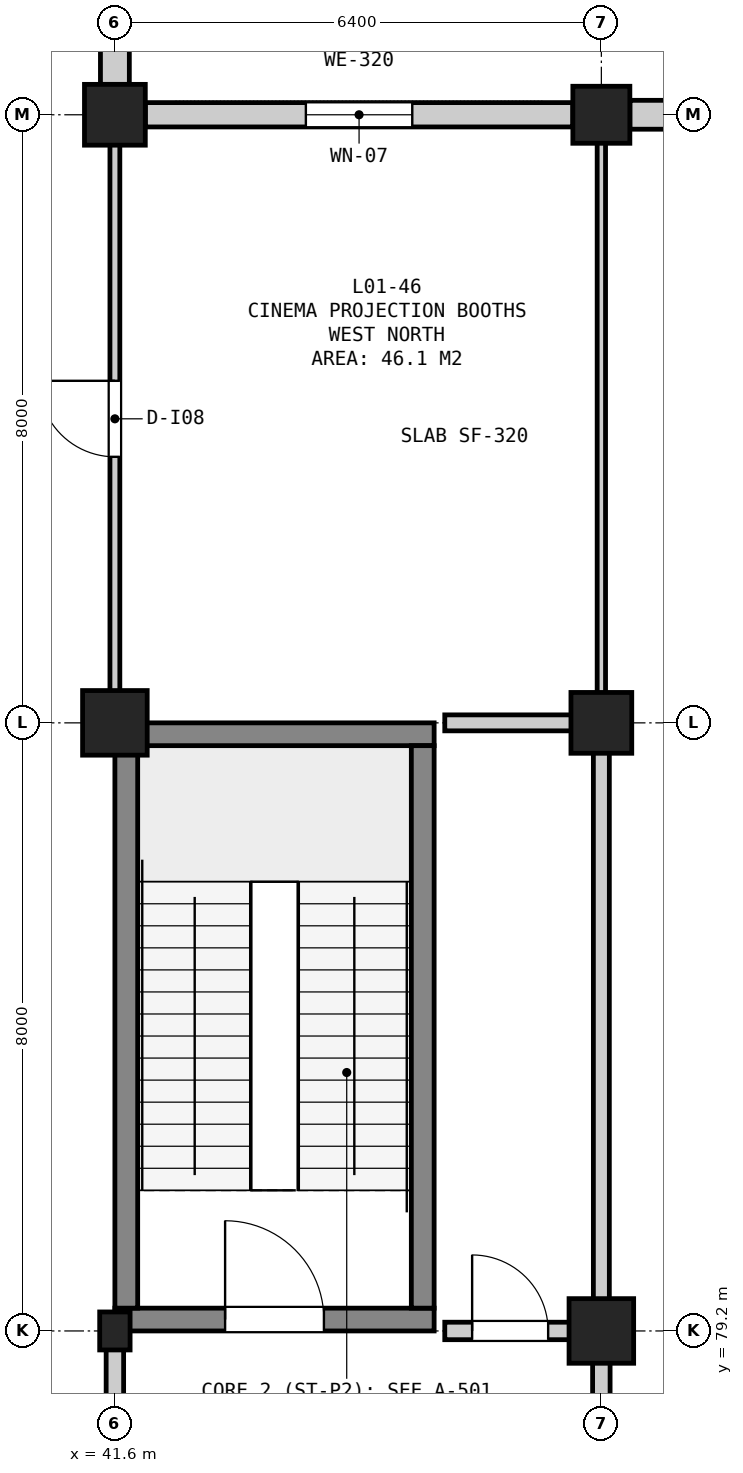
"""IFC4 building model, lengths in metres.
Left out: names, types, materials, properties, quantities, classifications, styles, units other than length and angle.
Written with IfcOpenShell. Run it as: python <this file> out.ifc"""

import sys

from ifc_helpers import new_model, si_unit, direction, frame, frame_2d, origin, origin_2d, place, context, subcontext, project, spatial, rectangle, extrude, element, fill, save


model = new_model("IFC4")
c1 = context("Model", 3, precision=1e-05, world=origin(), true_north=direction((0.0, 1.0)))
c2 = subcontext(c1, "Body", "Model", "MODEL_VIEW")
j1 = project(units=[si_unit("LENGTHUNIT", "METRE"), si_unit("PLANEANGLEUNIT", "RADIAN")], contexts=[c1])
p1 = place(None, origin())
s1 = spatial("IfcSite", under=j1, at=p1, CompositionType="ELEMENT")
p2 = place(p1, origin())
s2 = spatial("IfcBuilding", under=s1, at=p2, CompositionType="ELEMENT")
p3 = place(p2, frame((0.0, 0.0, 5.4)))
s3 = spatial("IfcBuildingStorey", under=s2, at=p3, CompositionType="ELEMENT", Elevation=5.4)
p4 = place(p3, frame((41.6, 79.2, 0.0), z_axis=(0.0, 0.0, 1.0), x_axis=(1.0, 0.0, 0.0)))
e1 = element("IfcColumn", 1, at=p4, inside=s3, PredefinedType="COLUMN", context=c2, shape_type="SweptSolid", body=[
    extrude(rectangle(XDim=0.4, YDim=0.5, at=origin_2d()), origin(), (0.0, 0.0, 1.0), 5.4),
])
p5 = place(p3, frame((41.6, 87.2, 0.0), z_axis=(0.0, 0.0, 1.0), x_axis=(1.0, 0.0, 0.0)))
e2 = element("IfcColumn", 2, at=p5, inside=s3, PredefinedType="COLUMN", context=c2, shape_type="SweptSolid", body=[
    extrude(rectangle(XDim=0.85, YDim=0.85, at=origin_2d()), origin(), (0.0, 0.0, 1.0), 5.4),
])
p6 = place(p3, frame((41.6, 95.2, 0.0), z_axis=(0.0, 0.0, 1.0), x_axis=(1.0, 0.0, 0.0)))
e3 = element("IfcColumn", 3, at=p6, inside=s3, PredefinedType="COLUMN", context=c2, shape_type="SweptSolid", body=[
    extrude(rectangle(XDim=0.8, YDim=0.8, at=origin_2d()), origin(), (0.0, 0.0, 1.0), 5.4),
])
p7 = place(p3, frame((48.0, 79.2, 0.0), z_axis=(0.0, 0.0, 1.0), x_axis=(1.0, 0.0, 0.0)))
e4 = element("IfcColumn", 4, at=p7, inside=s3, PredefinedType="COLUMN", context=c2, shape_type="SweptSolid", body=[
    extrude(rectangle(XDim=0.85, YDim=0.85, at=origin_2d()), origin(), (0.0, 0.0, 1.0), 5.4),
])
p8 = place(p3, frame((48.0, 87.2, 0.0), z_axis=(0.0, 0.0, 1.0), x_axis=(1.0, 0.0, 0.0)))
e5 = element("IfcColumn", 5, at=p8, inside=s3, PredefinedType="COLUMN", context=c2, shape_type="SweptSolid", body=[
    extrude(rectangle(XDim=0.8, YDim=0.8, at=origin_2d()), origin(), (0.0, 0.0, 1.0), 5.4),
])
p9 = place(p3, frame((48.0, 95.2, 0.0), z_axis=(0.0, 0.0, 1.0), x_axis=(1.0, 0.0, 0.0)))
e6 = element("IfcColumn", 6, at=p9, inside=s3, PredefinedType="COLUMN", context=c2, shape_type="SweptSolid", body=[
    extrude(rectangle(XDim=0.75, YDim=0.75, at=origin_2d()), origin(), (0.0, 0.0, 1.0), 5.4),
])
p10 = place(p3, frame((54.075, 95.2, 0.0), z_axis=(0.0, 0.0, 1.0), x_axis=(-1.0, 0.0, 0.0)))
e7 = element("IfcWall", 7, at=p10, inside=s3, PredefinedType="SOLIDWALL", context=c2, shape_type="SweptSolid", body=[
    extrude(rectangle(XDim=5.7, YDim=0.38, at=frame_2d((2.85, 0.0))), origin(), (0.0, 0.0, 1.0), 4.44),
])
p11 = place(p10, frame((2.1, 0.0, 0.9)))
e8 = element("IfcOpeningElement", 8, at=p11, cuts=e7, PredefinedType="OPENING", context=c2, shape_type="SweptSolid", body=[
    extrude(rectangle(XDim=1.5, YDim=1.85, at=frame_2d((0.75, 0.925))), frame((0.0, 0.202, 0.0), z_axis=(0.0, -1.0, 0.0), x_axis=(1.0, 0.0, 0.0)), (0.0, 0.0, 1.0), 0.404),
])
p12 = place(p3, frame((47.625, 95.2, 0.0), z_axis=(0.0, 0.0, 1.0), x_axis=(-1.0, 0.0, 0.0)))
e9 = element("IfcWall", 9, at=p12, inside=s3, PredefinedType="SOLIDWALL", context=c2, shape_type="SweptSolid", body=[
    extrude(rectangle(XDim=5.625, YDim=0.32, at=frame_2d((2.812, 0.0))), origin(), (0.0, 0.0, 1.0), 4.44),
])
p13 = place(p12, frame((2.113, 0.0, 0.9)))
e10 = element("IfcOpeningElement", 10, at=p13, cuts=e9, PredefinedType="OPENING", context=c2, shape_type="SweptSolid", body=[
    extrude(rectangle(XDim=1.4, YDim=1.8, at=frame_2d((0.7, 0.9))), frame((0.0, 0.172, 0.0), z_axis=(0.0, -1.0, 0.0), x_axis=(1.0, 0.0, 0.0)), (0.0, 0.0, 1.0), 0.344),
])
p14 = place(p3, frame((41.6, 95.6, 0.0), z_axis=(0.0, 0.0, 1.0), x_axis=(0.0, 1.0, 0.0)))
e11 = element("IfcWall", 11, at=p14, inside=s3, PredefinedType="SOLIDWALL", context=c2, shape_type="SweptSolid", body=[
    extrude(rectangle(XDim=12.875, YDim=0.38, at=frame_2d((6.438, 0.0))), origin(), (0.0, 0.0, 1.0), 3.975),
])
p15 = place(p14, frame((5.762, 0.0, 0.9)))
e12 = element("IfcOpeningElement", 12, at=p15, cuts=e11, PredefinedType="OPENING", context=c2, shape_type="SweptSolid", body=[
    extrude(rectangle(XDim=1.35, YDim=1.75, at=frame_2d((0.675, 0.875))), frame((0.0, 0.202, 0.0), z_axis=(0.0, -1.0, 0.0), x_axis=(1.0, 0.0, 0.0)), (0.0, 0.0, 1.0), 0.404),
])
p16 = place(p3, frame((41.6, 79.35, 0.0), z_axis=(0.0, 0.0, 1.0), x_axis=(1.0, 0.0, 0.0)))
e13 = element("IfcWall", 13, at=p16, inside=s3, PredefinedType="SHEAR", context=c2, shape_type="SweptSolid", body=[
    extrude(rectangle(XDim=4.2, YDim=0.3, at=frame_2d((2.1, 0.0))), origin(), (0.0, 0.0, 1.0), 5.1),
])
p17 = place(p16, frame((1.45, 0.0, 0.0)))
e14 = element("IfcOpeningElement", 14, at=p17, cuts=e13, PredefinedType="OPENING", context=c2, shape_type="SweptSolid", body=[
    extrude(rectangle(XDim=1.3, YDim=2.18, at=frame_2d((0.65, 1.09))), frame((0.0, 0.162, 0.0), z_axis=(0.0, -1.0, 0.0), x_axis=(1.0, 0.0, 0.0)), (0.0, 0.0, 1.0), 0.324),
])
p18 = place(p3, frame((41.6, 87.05, 0.0), z_axis=(0.0, 0.0, 1.0), x_axis=(1.0, 0.0, 0.0)))
e15 = element("IfcWall", 15, at=p18, inside=s3, PredefinedType="SHEAR", context=c2, shape_type="SweptSolid", body=[
    extrude(rectangle(XDim=4.2, YDim=0.3, at=frame_2d((2.1, 0.0))), origin(), (0.0, 0.0, 1.0), 5.1),
])
for number, where, z_axis, x_axis in (
    (16, (41.75, 79.5, 0.0), (0.0, 0.0, 1.0), (0.0, 1.0, 0.0)),
    (17, (45.65, 79.5, 0.0), (0.0, 0.0, 1.0), (0.0, 1.0, 0.0)),
):
    element("IfcWall", number, at=place(p3, frame(where, z_axis=z_axis, x_axis=x_axis)), inside=s3, PredefinedType="SHEAR", context=c2, shape_type="SweptSolid", body=[
        extrude(rectangle(XDim=7.4, YDim=0.3, at=frame_2d((3.7, 0.0))), origin(), (0.0, 0.0, 1.0), 5.1),
    ])
p19 = place(p3, frame((45.94, 79.2, 0.0), z_axis=(0.0, 0.0, 1.0), x_axis=(1.0, 0.0, 0.0)))
e18 = element("IfcWall", 18, at=p19, inside=s3, PredefinedType="SOLIDWALL", context=c2, shape_type="SweptSolid", body=[
    extrude(rectangle(XDim=1.92, YDim=0.23, at=frame_2d((0.96, 0.0))), origin(), (0.0, 0.0, 1.0), 4.435),
])
p20 = place(p19, frame((0.36, 0.0, 0.0)))
e19 = element("IfcOpeningElement", 19, at=p20, cuts=e18, PredefinedType="OPENING", context=c2, shape_type="SweptSolid", body=[
    extrude(rectangle(XDim=1.0, YDim=2.15, at=frame_2d((0.5, 1.075))), frame((0.0, 0.127, 0.0), z_axis=(0.0, -1.0, 0.0), x_axis=(1.0, 0.0, 0.0)), (0.0, 0.0, 1.0), 0.254),
])
for number, where, z_axis, x_axis in (
    (20, (41.6, 75.54, 0.0), (0.0, 0.0, 1.0), (0.0, 1.0, 0.0)),
    (21, (48.0, 75.54, 0.0), (0.0, 0.0, 1.0), (0.0, 1.0, 0.0)),
):
    element("IfcWall", number, at=place(p3, frame(where, z_axis=z_axis, x_axis=x_axis)), inside=s3, PredefinedType="SOLIDWALL", context=c2, shape_type="SweptSolid", body=[
        extrude(rectangle(XDim=3.52, YDim=0.23, at=frame_2d((1.76, 0.0))), origin(), (0.0, 0.0, 1.0), 4.435),
    ])
p21 = place(p3, frame((45.94, 87.2, 0.0), z_axis=(0.0, 0.0, 1.0), x_axis=(1.0, 0.0, 0.0)))
e22 = element("IfcWall", 22, at=p21, inside=s3, PredefinedType="SOLIDWALL", context=c2, shape_type="SweptSolid", body=[
    extrude(rectangle(XDim=1.92, YDim=0.21, at=frame_2d((0.96, 0.0))), origin(), (0.0, 0.0, 1.0), 4.585),
])
p22 = place(p3, frame((48.0, 79.34, 0.0), z_axis=(0.0, 0.0, 1.0), x_axis=(0.0, 1.0, 0.0)))
e23 = element("IfcWall", 23, at=p22, inside=s3, PredefinedType="SOLIDWALL", context=c2, shape_type="SweptSolid", body=[
    extrude(rectangle(XDim=7.72, YDim=0.21, at=frame_2d((3.86, 0.0))), origin(), (0.0, 0.0, 1.0), 4.535),
])
p23 = place(p3, frame((41.6, 87.34, 0.0), z_axis=(0.0, 0.0, 1.0), x_axis=(0.0, 1.0, 0.0)))
e24 = element("IfcWall", 24, at=p23, inside=s3, PredefinedType="PARTITIONING", context=c2, shape_type="SweptSolid", body=[
    extrude(rectangle(XDim=7.755, YDim=0.13, at=frame_2d((3.877, 0.0))), origin(), (0.0, 0.0, 1.0), 4.585),
])
p24 = place(p23, frame((3.36, 0.0, 0.0)))
e25 = element("IfcOpeningElement", 25, at=p24, cuts=e24, PredefinedType="OPENING", context=c2, shape_type="SweptSolid", body=[
    extrude(rectangle(XDim=1.0, YDim=2.15, at=frame_2d((0.5, 1.075))), frame((0.0, 0.077, 0.0), z_axis=(0.0, -1.0, 0.0), x_axis=(1.0, 0.0, 0.0)), (0.0, 0.0, 1.0), 0.154),
])
p25 = place(p3, frame((48.0, 87.34, 0.0), z_axis=(0.0, 0.0, 1.0), x_axis=(0.0, 1.0, 0.0)))
e26 = element("IfcWall", 26, at=p25, inside=s3, PredefinedType="PARTITIONING", context=c2, shape_type="SweptSolid", body=[
    extrude(rectangle(XDim=7.755, YDim=0.11, at=frame_2d((3.877, 0.0))), origin(), (0.0, 0.0, 1.0), 4.585),
])
p26 = place(p13, origin())
e27 = element("IfcWindow", 27, at=p26, inside=s3, PartitioningType="SINGLE_PANEL", PredefinedType="WINDOW", context=c2, shape_type="SweptSolid", body=[
    extrude(rectangle(XDim=1.4, YDim=1.8, at=frame_2d((0.7, 0.9))), frame((0.0, 0.03, 0.0), z_axis=(0.0, -1.0, 0.0), x_axis=(1.0, 0.0, 0.0)), (0.0, 0.0, 1.0), 0.06),
])
fill(e10, e27)
p27 = place(p17, origin())
e28 = element("IfcDoor", 28, at=p27, inside=s3, OperationType="SINGLE_SWING_LEFT", PredefinedType="DOOR", context=c2, shape_type="SweptSolid", body=[
    extrude(rectangle(XDim=1.3, YDim=2.18, at=frame_2d((0.65, 1.09))), frame((0.0, 0.025, 0.0), z_axis=(0.0, -1.0, 0.0), x_axis=(1.0, 0.0, 0.0)), (0.0, 0.0, 1.0), 0.05),
])
fill(e14, e28)
p28 = place(p20, origin())
e29 = element("IfcDoor", 29, at=p28, inside=s3, OperationType="SINGLE_SWING_LEFT", PredefinedType="DOOR", context=c2, shape_type="SweptSolid", body=[
    extrude(rectangle(XDim=1.0, YDim=2.15, at=frame_2d((0.5, 1.075))), frame((0.0, 0.025, 0.0), z_axis=(0.0, -1.0, 0.0), x_axis=(1.0, 0.0, 0.0)), (0.0, 0.0, 1.0), 0.05),
])
fill(e19, e29)
p29 = place(p24, origin())
e30 = element("IfcDoor", 30, at=p29, inside=s3, OperationType="SINGLE_SWING_RIGHT", PredefinedType="DOOR", context=c2, shape_type="SweptSolid", body=[
    extrude(rectangle(XDim=1.0, YDim=2.15, at=frame_2d((0.5, 1.075))), frame((0.0, 0.025, 0.0), z_axis=(0.0, -1.0, 0.0), x_axis=(1.0, 0.0, 0.0)), (0.0, 0.0, 1.0), 0.05),
])
fill(e25, e30)
save(model, sys.argv[1])
